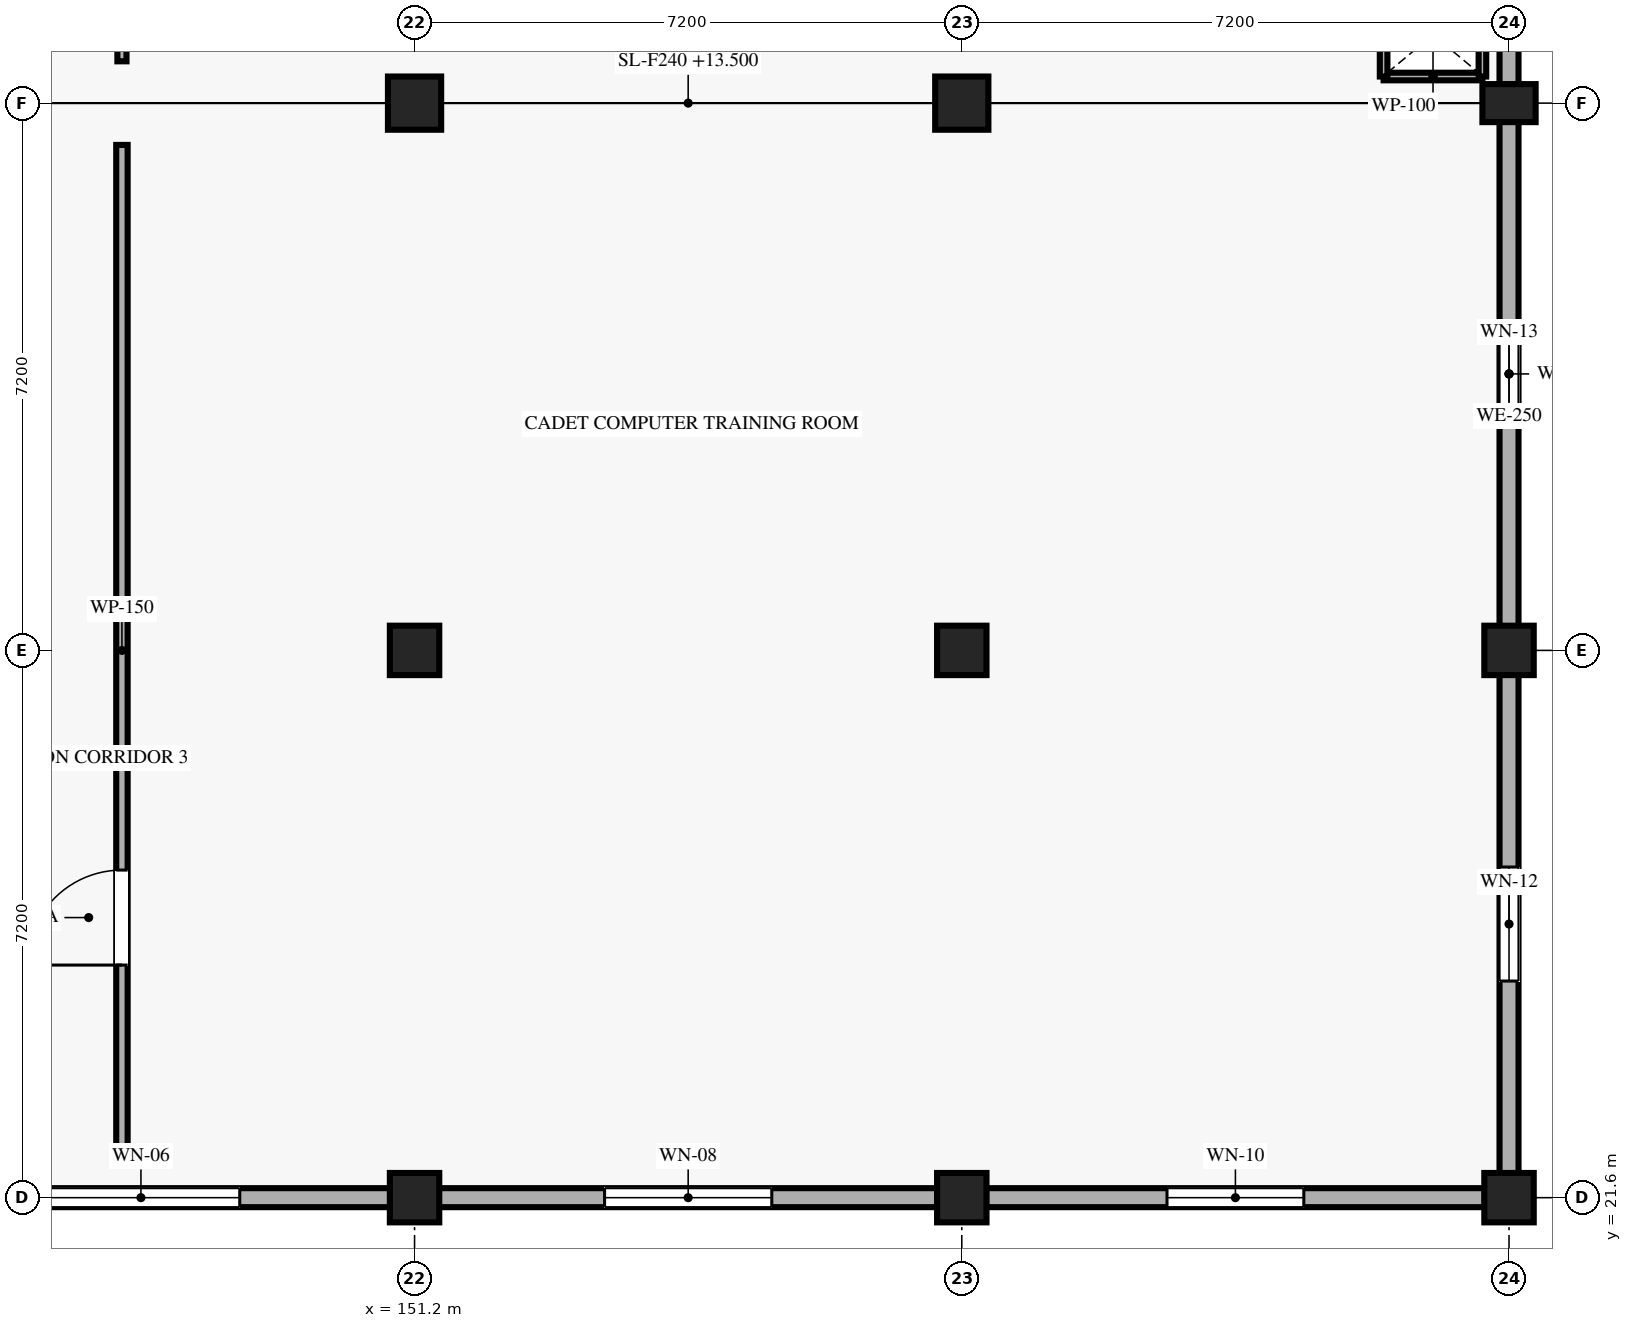
"""IFC4 building model, lengths in metres.
Left out: names, types, materials, properties, quantities, classifications, styles, units other than length and angle.
Written with IfcOpenShell. Run it as: python <this file> out.ifc"""

import sys

from ifc_helpers import new_model, si_unit, direction, frame, frame_2d, origin, origin_2d, place, context, subcontext, project, spatial, rectangle, extrude, element, fill, save


model = new_model("IFC4")
c1 = context("Model", 3, precision=1e-05, world=origin(), true_north=direction((0.0, 1.0)))
c2 = subcontext(c1, "Body", "Model", "MODEL_VIEW")
j1 = project(units=[si_unit("LENGTHUNIT", "METRE"), si_unit("PLANEANGLEUNIT", "RADIAN")], contexts=[c1])
p1 = place(None, origin())
s1 = spatial("IfcSite", under=j1, at=p1, CompositionType="ELEMENT")
p2 = place(p1, origin())
s2 = spatial("IfcBuilding", under=s1, at=p2, CompositionType="ELEMENT")
p3 = place(p2, frame((0.0, 0.0, 13.5)))
s3 = spatial("IfcBuildingStorey", under=s2, at=p3, CompositionType="ELEMENT", Elevation=13.5)
for number, where, z_axis, x_axis in (
    (1, (151.2, 21.6, 0.0), (0.0, 0.0, 1.0), (1.0, 0.0, 0.0)),
    (2, (151.2, 28.8, 0.0), (0.0, 0.0, 1.0), (1.0, 0.0, 0.0)),
):
    element("IfcColumn", number, at=place(p3, frame(where, z_axis=z_axis, x_axis=x_axis)), inside=s3, PredefinedType="COLUMN", context=c2, shape_type="SweptSolid", body=[
        extrude(rectangle(XDim=0.65, YDim=0.65, at=origin_2d()), origin(), (0.0, 0.0, 1.0), 4.05),
    ])
p4 = place(p3, frame((151.2, 36.0, 0.0), z_axis=(0.0, 0.0, 1.0), x_axis=(1.0, 0.0, 0.0)))
e3 = element("IfcColumn", 3, at=p4, inside=s3, PredefinedType="COLUMN", context=c2, shape_type="SweptSolid", body=[
    extrude(rectangle(XDim=0.7, YDim=0.7, at=origin_2d()), origin(), (0.0, 0.0, 1.0), 4.05),
])
for number, where, z_axis, x_axis in (
    (4, (158.4, 21.6, 0.0), (0.0, 0.0, 1.0), (1.0, 0.0, 0.0)),
    (5, (158.4, 28.8, 0.0), (0.0, 0.0, 1.0), (1.0, 0.0, 0.0)),
):
    element("IfcColumn", number, at=place(p3, frame(where, z_axis=z_axis, x_axis=x_axis)), inside=s3, PredefinedType="COLUMN", context=c2, shape_type="SweptSolid", body=[
        extrude(rectangle(XDim=0.65, YDim=0.65, at=origin_2d()), origin(), (0.0, 0.0, 1.0), 4.05),
    ])
p5 = place(p3, frame((158.4, 36.0, 0.0), z_axis=(0.0, 0.0, 1.0), x_axis=(1.0, 0.0, 0.0)))
e6 = element("IfcColumn", 6, at=p5, inside=s3, PredefinedType="COLUMN", context=c2, shape_type="SweptSolid", body=[
    extrude(rectangle(XDim=0.7, YDim=0.7, at=origin_2d()), origin(), (0.0, 0.0, 1.0), 4.05),
])
for number, where, z_axis, x_axis in (
    (7, (165.6, 21.6, 0.0), (0.0, 0.0, 1.0), (1.0, 0.0, 0.0)),
    (8, (165.6, 28.8, 0.0), (0.0, 0.0, 1.0), (1.0, 0.0, 0.0)),
):
    element("IfcColumn", number, at=place(p3, frame(where, z_axis=z_axis, x_axis=x_axis)), inside=s3, PredefinedType="COLUMN", context=c2, shape_type="SweptSolid", body=[
        extrude(rectangle(XDim=0.65, YDim=0.65, at=origin_2d()), origin(), (0.0, 0.0, 1.0), 4.05),
    ])
p6 = place(p3, frame((165.6, 36.0, 0.0), z_axis=(0.0, 0.0, 1.0), x_axis=(0.0, 1.0, 0.0)))
e9 = element("IfcColumn", 9, at=p6, inside=s3, PredefinedType="COLUMN", context=c2, shape_type="SweptSolid", body=[
    extrude(rectangle(XDim=0.5, YDim=0.7, at=origin_2d()), origin(), (0.0, 0.0, 1.0), 4.05),
])
p7 = place(p3, frame((144.32, 21.6, 0.0), z_axis=(0.0, 0.0, 1.0), x_axis=(1.0, 0.0, 0.0)))
e10 = element("IfcWall", 10, at=p7, inside=s3, PredefinedType="SOLIDWALL", context=c2, shape_type="SweptSolid", body=[
    extrude(rectangle(XDim=6.56, YDim=0.25, at=frame_2d((3.28, 0.0))), origin(), (0.0, 0.0, 1.0), 3.195),
])
p8 = place(p7, frame((1.98, 0.0, 0.85)))
e11 = element("IfcOpeningElement", 11, at=p8, cuts=e10, PredefinedType="OPENING", context=c2, shape_type="SweptSolid", body=[
    extrude(rectangle(XDim=2.6, YDim=1.8, at=frame_2d((1.3, 0.9))), frame((0.0, 0.135, 0.0), z_axis=(0.0, -1.0, 0.0), x_axis=(1.0, 0.0, 0.0)), (0.0, 0.0, 1.0), 0.27),
])
p9 = place(p3, frame((151.52, 21.6, 0.0), z_axis=(0.0, 0.0, 1.0), x_axis=(1.0, 0.0, 0.0)))
e12 = element("IfcWall", 12, at=p9, inside=s3, PredefinedType="SOLIDWALL", context=c2, shape_type="SweptSolid", body=[
    extrude(rectangle(XDim=6.56, YDim=0.25, at=frame_2d((3.28, 0.0))), origin(), (0.0, 0.0, 1.0), 3.195),
])
p10 = place(p9, frame((2.18, 0.0, 0.85)))
e13 = element("IfcOpeningElement", 13, at=p10, cuts=e12, PredefinedType="OPENING", context=c2, shape_type="SweptSolid", body=[
    extrude(rectangle(XDim=2.2, YDim=1.7, at=frame_2d((1.1, 0.85))), frame((0.0, 0.135, 0.0), z_axis=(0.0, -1.0, 0.0), x_axis=(1.0, 0.0, 0.0)), (0.0, 0.0, 1.0), 0.27),
])
p11 = place(p3, frame((158.72, 21.6, 0.0), z_axis=(0.0, 0.0, 1.0), x_axis=(1.0, 0.0, 0.0)))
e14 = element("IfcWall", 14, at=p11, inside=s3, PredefinedType="SOLIDWALL", context=c2, shape_type="SweptSolid", body=[
    extrude(rectangle(XDim=6.56, YDim=0.25, at=frame_2d((3.28, 0.0))), origin(), (0.0, 0.0, 1.0), 3.195),
])
p12 = place(p11, frame((2.38, 0.0, 0.85)))
e15 = element("IfcOpeningElement", 15, at=p12, cuts=e14, PredefinedType="OPENING", context=c2, shape_type="SweptSolid", body=[
    extrude(rectangle(XDim=1.8, YDim=1.6, at=frame_2d((0.9, 0.8))), frame((0.0, 0.135, 0.0), z_axis=(0.0, -1.0, 0.0), x_axis=(1.0, 0.0, 0.0)), (0.0, 0.0, 1.0), 0.27),
])
p13 = place(p3, frame((165.6, 21.92, 0.0), z_axis=(0.0, 0.0, 1.0), x_axis=(0.0, 1.0, 0.0)))
e16 = element("IfcWall", 16, at=p13, inside=s3, PredefinedType="SOLIDWALL", context=c2, shape_type="SweptSolid", body=[
    extrude(rectangle(XDim=6.56, YDim=0.25, at=frame_2d((3.28, 0.0))), origin(), (0.0, 0.0, 1.0), 3.195),
])
p14 = place(p13, frame((2.53, 0.0, 0.85)))
e17 = element("IfcOpeningElement", 17, at=p14, cuts=e16, PredefinedType="OPENING", context=c2, shape_type="SweptSolid", body=[
    extrude(rectangle(XDim=1.5, YDim=2.05, at=frame_2d((0.75, 1.025))), frame((0.0, 0.135, 0.0), z_axis=(0.0, -1.0, 0.0), x_axis=(1.0, 0.0, 0.0)), (0.0, 0.0, 1.0), 0.27),
])
p15 = place(p3, frame((165.6, 29.12, 0.0), z_axis=(0.0, 0.0, 1.0), x_axis=(0.0, 1.0, 0.0)))
e18 = element("IfcWall", 18, at=p15, inside=s3, PredefinedType="SOLIDWALL", context=c2, shape_type="SweptSolid", body=[
    extrude(rectangle(XDim=6.635, YDim=0.25, at=frame_2d((3.317, 0.0))), origin(), (0.0, 0.0, 1.0), 3.195),
])
p16 = place(p15, frame((2.617, 0.0, 0.85)))
e19 = element("IfcOpeningElement", 19, at=p16, cuts=e18, PredefinedType="OPENING", context=c2, shape_type="SweptSolid", body=[
    extrude(rectangle(XDim=1.4, YDim=1.6, at=frame_2d((0.7, 0.8))), frame((0.0, 0.135, 0.0), z_axis=(0.0, -1.0, 0.0), x_axis=(1.0, 0.0, 0.0)), (0.0, 0.0, 1.0), 0.27),
])
p17 = place(p3, frame((165.6, 36.245, 0.0), z_axis=(0.0, 0.0, 1.0), x_axis=(0.0, 1.0, 0.0)))
e20 = element("IfcWall", 20, at=p17, inside=s3, PredefinedType="SOLIDWALL", context=c2, shape_type="SweptSolid", body=[
    extrude(rectangle(XDim=3.16, YDim=0.25, at=frame_2d((1.58, 0.0))), origin(), (0.0, 0.0, 1.0), 3.195),
])
p18 = place(p17, frame((0.955, 0.0, 0.85)))
e21 = element("IfcOpeningElement", 21, at=p18, cuts=e20, PredefinedType="OPENING", context=c2, shape_type="SweptSolid", body=[
    extrude(rectangle(XDim=1.25, YDim=1.5, at=frame_2d((0.625, 0.75))), frame((0.0, 0.135, 0.0), z_axis=(0.0, -1.0, 0.0), x_axis=(1.0, 0.0, 0.0)), (0.0, 0.0, 1.0), 0.27),
])
p19 = place(p3, frame((163.95, 36.35, 0.0), z_axis=(0.0, 0.0, 1.0), x_axis=(1.0, 0.0, 0.0)))
e22 = element("IfcWall", 22, at=p19, inside=s3, PredefinedType="PARTITIONING", context=c2, shape_type="SweptSolid", body=[
    extrude(rectangle(XDim=1.3, YDim=0.1, at=frame_2d((0.65, 0.0))), origin(), (0.0, 0.0, 1.0), 3.2),
])
p20 = place(p3, frame((163.95, 36.35, 0.0), z_axis=(0.0, 0.0, 1.0), x_axis=(0.0, 1.0, 0.0)))
e23 = element("IfcWall", 23, at=p20, inside=s3, PredefinedType="PARTITIONING", context=c2, shape_type="SweptSolid", body=[
    extrude(rectangle(XDim=1.1, YDim=0.1, at=frame_2d((0.55, 0.0))), origin(), (0.0, 0.0, 1.0), 3.81),
])
p21 = place(p3, frame((165.25, 36.35, 0.0), z_axis=(0.0, 0.0, 1.0), x_axis=(0.0, 1.0, 0.0)))
e24 = element("IfcWall", 24, at=p21, inside=s3, PredefinedType="PARTITIONING", context=c2, shape_type="SweptSolid", body=[
    extrude(rectangle(XDim=1.1, YDim=0.1, at=frame_2d((0.55, 0.0))), origin(), (0.0, 0.0, 1.0), 3.2),
])
p22 = place(p3, frame((147.35, 36.55, 0.0), z_axis=(0.0, 0.0, 1.0), x_axis=(0.0, 1.0, 0.0)))
e25 = element("IfcWall", 25, at=p22, inside=s3, PredefinedType="PARTITIONING", context=c2, shape_type="SweptSolid", body=[
    extrude(rectangle(XDim=15.95, YDim=0.12, at=frame_2d((7.975, 0.0))), origin(), (0.0, 0.0, 1.0), 3.81),
])
p23 = place(p22, frame((2.25, 0.0, 0.0)))
e26 = element("IfcOpeningElement", 26, at=p23, cuts=e25, PredefinedType="OPENING", context=c2, shape_type="SweptSolid", body=[
    extrude(rectangle(XDim=1.7, YDim=2.2, at=frame_2d((0.85, 1.1))), frame((0.0, 0.07, 0.0), z_axis=(0.0, -1.0, 0.0), x_axis=(1.0, 0.0, 0.0)), (0.0, 0.0, 1.0), 0.14),
])
p24 = place(p3, frame((147.35, 22.15, 0.0), z_axis=(0.0, 0.0, 1.0), x_axis=(0.0, 1.0, 0.0)))
e27 = element("IfcWall", 27, at=p24, inside=s3, PredefinedType="PARTITIONING", context=c2, shape_type="SweptSolid", body=[
    extrude(rectangle(XDim=13.3, YDim=0.15, at=frame_2d((6.65, 0.0))), origin(), (0.0, 0.0, 1.0), 3.81),
])
p25 = place(p24, frame((2.51, 0.0, 0.0)))
e28 = element("IfcOpeningElement", 28, at=p25, cuts=e27, PredefinedType="OPENING", context=c2, shape_type="SweptSolid", body=[
    extrude(rectangle(XDim=1.25, YDim=2.2, at=frame_2d((0.625, 1.1))), frame((0.0, 0.085, 0.0), z_axis=(0.0, -1.0, 0.0), x_axis=(1.0, 0.0, 0.0)), (0.0, 0.0, 1.0), 0.17),
])
p26 = place(p8, origin())
e29 = element("IfcWindow", 29, at=p26, inside=s3, PartitioningType="SINGLE_PANEL", PredefinedType="WINDOW", context=c2, shape_type="SweptSolid", body=[
    extrude(rectangle(XDim=2.6, YDim=1.8, at=frame_2d((1.3, 0.9))), frame((0.0, 0.03, 0.0), z_axis=(0.0, -1.0, 0.0), x_axis=(1.0, 0.0, 0.0)), (0.0, 0.0, 1.0), 0.06),
])
fill(e11, e29)
p27 = place(p10, origin())
e30 = element("IfcWindow", 30, at=p27, inside=s3, PartitioningType="SINGLE_PANEL", PredefinedType="WINDOW", context=c2, shape_type="SweptSolid", body=[
    extrude(rectangle(XDim=2.2, YDim=1.7, at=frame_2d((1.1, 0.85))), frame((0.0, 0.03, 0.0), z_axis=(0.0, -1.0, 0.0), x_axis=(1.0, 0.0, 0.0)), (0.0, 0.0, 1.0), 0.06),
])
fill(e13, e30)
p28 = place(p12, origin())
e31 = element("IfcWindow", 31, at=p28, inside=s3, PartitioningType="SINGLE_PANEL", PredefinedType="WINDOW", context=c2, shape_type="SweptSolid", body=[
    extrude(rectangle(XDim=1.8, YDim=1.6, at=frame_2d((0.9, 0.8))), frame((0.0, 0.03, 0.0), z_axis=(0.0, -1.0, 0.0), x_axis=(1.0, 0.0, 0.0)), (0.0, 0.0, 1.0), 0.06),
])
fill(e15, e31)
p29 = place(p14, origin())
e32 = element("IfcWindow", 32, at=p29, inside=s3, PartitioningType="SINGLE_PANEL", PredefinedType="WINDOW", context=c2, shape_type="SweptSolid", body=[
    extrude(rectangle(XDim=1.5, YDim=2.05, at=frame_2d((0.75, 1.025))), frame((0.0, 0.03, 0.0), z_axis=(0.0, -1.0, 0.0), x_axis=(1.0, 0.0, 0.0)), (0.0, 0.0, 1.0), 0.06),
])
fill(e17, e32)
p30 = place(p16, origin())
e33 = element("IfcWindow", 33, at=p30, inside=s3, PartitioningType="SINGLE_PANEL", PredefinedType="WINDOW", context=c2, shape_type="SweptSolid", body=[
    extrude(rectangle(XDim=1.4, YDim=1.6, at=frame_2d((0.7, 0.8))), frame((0.0, 0.03, 0.0), z_axis=(0.0, -1.0, 0.0), x_axis=(1.0, 0.0, 0.0)), (0.0, 0.0, 1.0), 0.06),
])
fill(e19, e33)
p31 = place(p25, origin())
e34 = element("IfcDoor", 34, at=p31, inside=s3, OperationType="SINGLE_SWING_LEFT", PredefinedType="DOOR", context=c2, shape_type="SweptSolid", body=[
    extrude(rectangle(XDim=1.25, YDim=2.2, at=frame_2d((0.625, 1.1))), frame((0.0, 0.025, 0.0), z_axis=(0.0, -1.0, 0.0), x_axis=(1.0, 0.0, 0.0)), (0.0, 0.0, 1.0), 0.05),
])
fill(e28, e34)
save(model, sys.argv[1])
